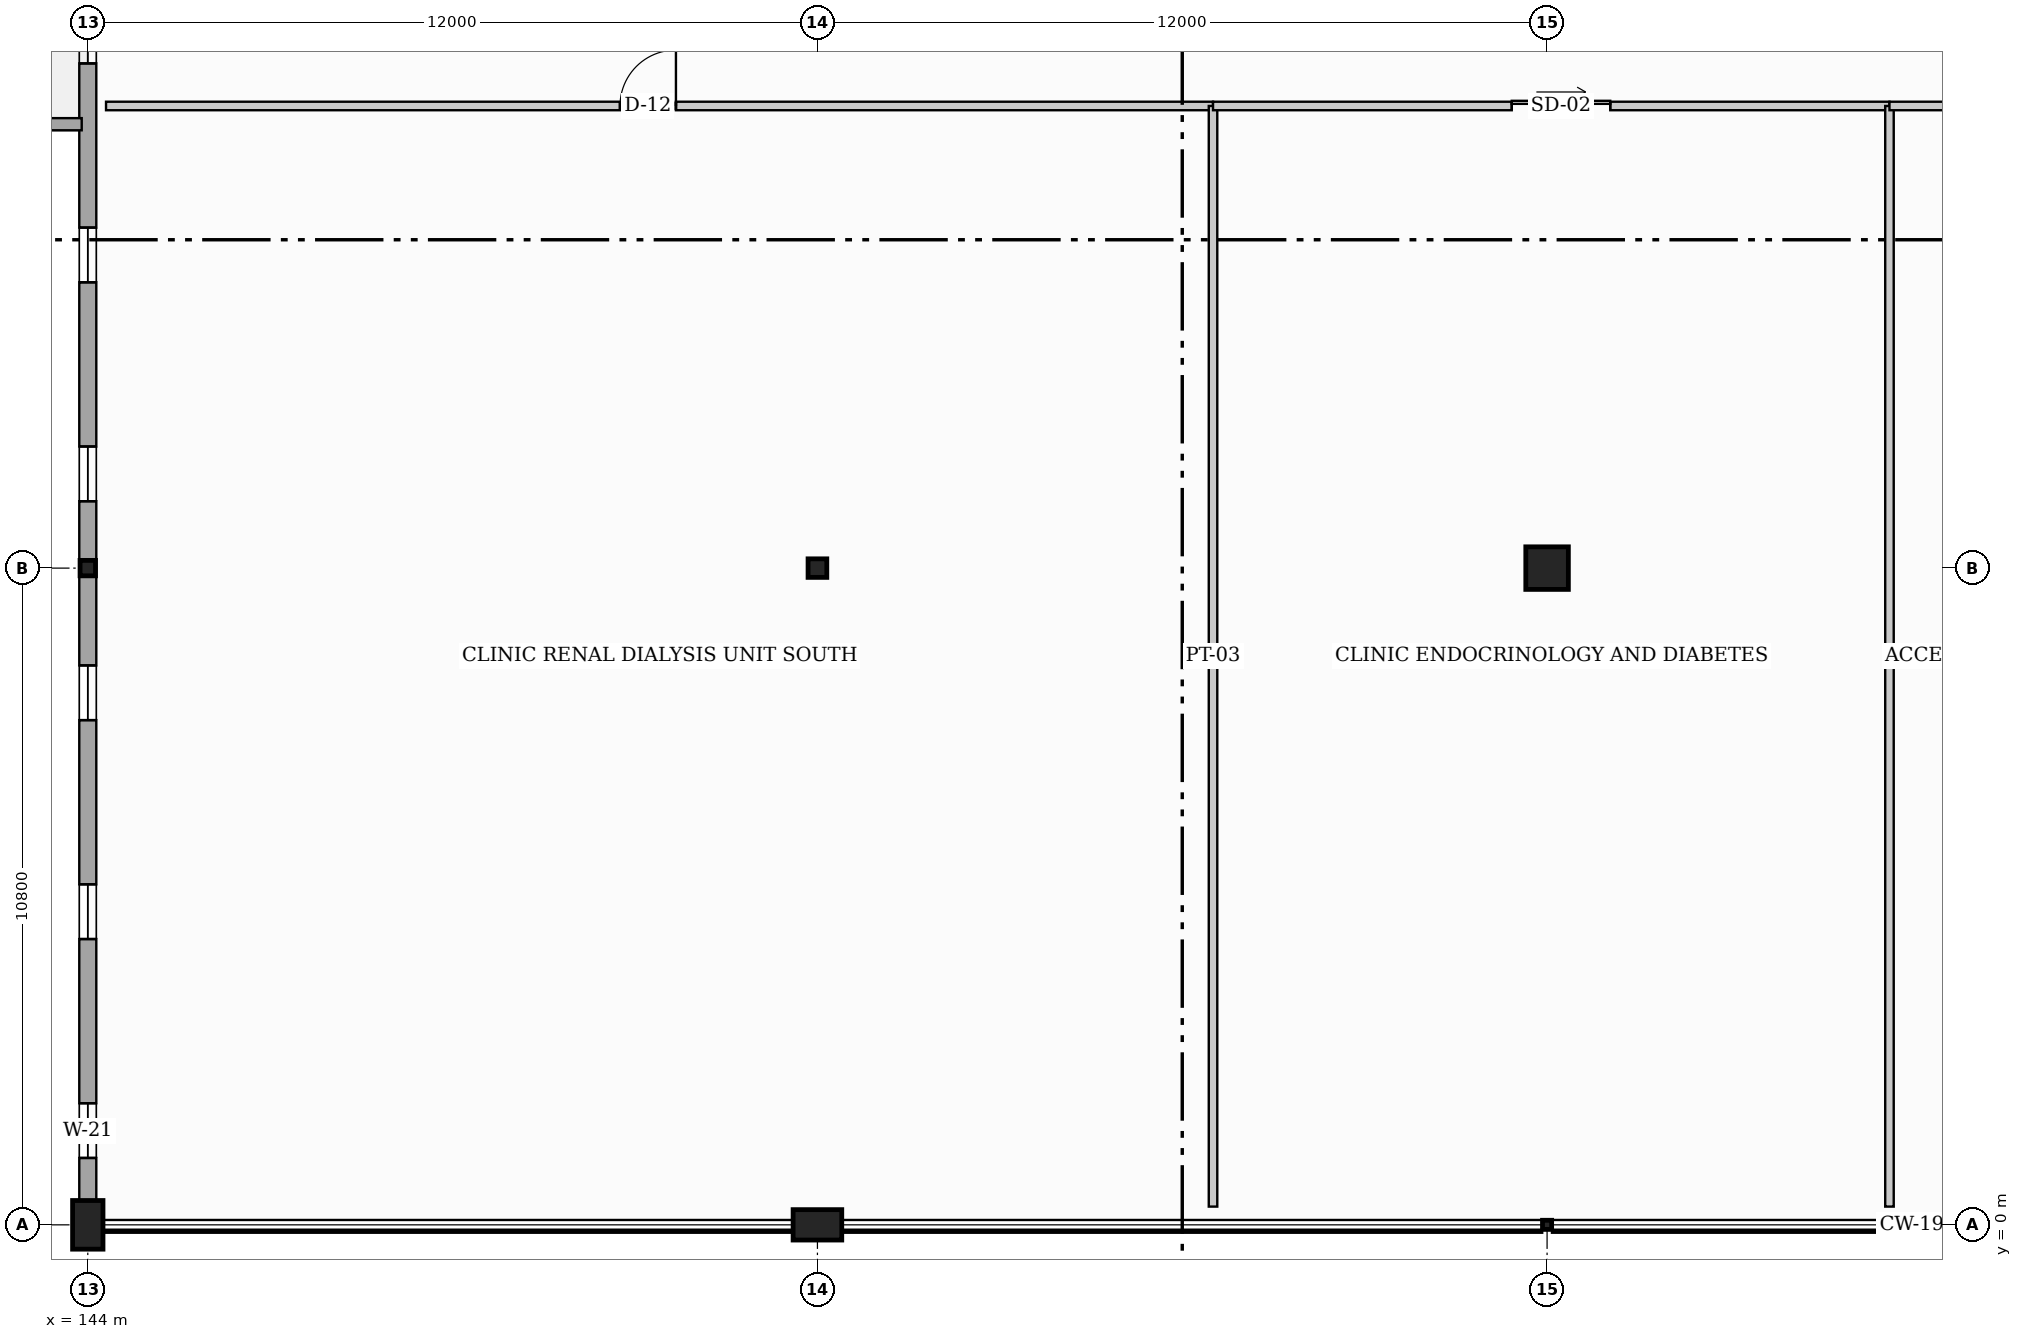
"""IFC4 building model, lengths in metres.
Left out: names, types, materials, properties, quantities, classifications, styles, units other than length and angle.
Written with IfcOpenShell. Run it as: python <this file> out.ifc"""

import sys

from ifc_helpers import new_model, si_unit, direction, frame, frame_2d, origin, origin_2d, place, context, subcontext, project, spatial, rectangle, hollow_rectangle, i_section, extrude, element, fill, save


model = new_model("IFC4")
c1 = context("Model", 3, precision=1e-05, world=origin(), true_north=direction((0.0, 1.0)))
c2 = subcontext(c1, "Body", "Model", "MODEL_VIEW")
j1 = project(units=[si_unit("LENGTHUNIT", "METRE"), si_unit("PLANEANGLEUNIT", "RADIAN")], contexts=[c1])
p1 = place(None, origin())
s1 = spatial("IfcSite", under=j1, at=p1, CompositionType="ELEMENT")
p2 = place(p1, origin())
s2 = spatial("IfcBuilding", under=s1, at=p2, CompositionType="ELEMENT")
p3 = place(p2, frame((0.0, 0.0, 14.4)))
s3 = spatial("IfcBuildingStorey", under=s2, at=p3, CompositionType="ELEMENT", Elevation=14.4)
p4 = place(p3, frame((144.0, 0.0, 0.0), z_axis=(0.0, 0.0, 1.0), x_axis=(1.0, 0.0, 0.0)))
e1 = element("IfcColumn", 1, at=p4, inside=s3, PredefinedType="PILASTER", context=c2, shape_type="SweptSolid", body=[
    extrude(rectangle(XDim=0.5, YDim=0.8, at=origin_2d()), origin(), (0.0, 0.0, 1.0), 3.9),
])
p5 = place(p3, frame((144.0, 10.8, 0.0), z_axis=(0.0, 0.0, 1.0), x_axis=(1.0, 0.0, 0.0)))
e2 = element("IfcColumn", 2, at=p5, inside=s3, PredefinedType="COLUMN", context=c2, shape_type="SweptSolid", body=[
    extrude(i_section(OverallWidth=0.254, OverallDepth=0.254, WebThickness=0.009, FlangeThickness=0.014, at=origin_2d()), origin(), (0.0, 0.0, 1.0), 3.9),
])
p6 = place(p3, frame((156.0, 0.0, 0.0), z_axis=(0.0, 0.0, 1.0), x_axis=(0.0, 1.0, 0.0)))
e3 = element("IfcColumn", 3, at=p6, inside=s3, PredefinedType="PILASTER", context=c2, shape_type="SweptSolid", body=[
    extrude(rectangle(XDim=0.5, YDim=0.8, at=origin_2d()), origin(), (0.0, 0.0, 1.0), 3.9),
])
p7 = place(p3, frame((156.0, 10.8, 0.0), z_axis=(0.0, 0.0, 1.0), x_axis=(0.0, 1.0, 0.0)))
e4 = element("IfcColumn", 4, at=p7, inside=s3, PredefinedType="COLUMN", context=c2, shape_type="SweptSolid", body=[
    extrude(i_section(OverallWidth=0.305, OverallDepth=0.308, WebThickness=0.01, FlangeThickness=0.015, at=origin_2d()), origin(), (0.0, 0.0, 1.0), 3.9),
])
p8 = place(p3, frame((168.0, 0.0, 0.0), z_axis=(0.0, 0.0, 1.0), x_axis=(1.0, 0.0, 0.0)))
e5 = element("IfcColumn", 5, at=p8, inside=s3, PredefinedType="COLUMN", context=c2, shape_type="SweptSolid", body=[
    extrude(hollow_rectangle(XDim=0.15, YDim=0.15, WallThickness=0.008, at=origin_2d()), origin(), (0.0, 0.0, 1.0), 3.9),
])
p9 = place(p3, frame((168.0, 10.8, 0.0), z_axis=(0.0, 0.0, 1.0), x_axis=(1.0, 0.0, 0.0)))
e6 = element("IfcColumn", 6, at=p9, inside=s3, PredefinedType="COLUMN", context=c2, shape_type="SweptSolid", body=[
    extrude(rectangle(XDim=0.7, YDim=0.7, at=origin_2d()), origin(), (0.0, 0.0, 1.0), 3.9),
])
p10 = place(p3, frame((144.0, 0.0, 0.0), z_axis=(0.0, 0.0, 1.0), x_axis=(0.0, 1.0, 0.0)))
e7 = element("IfcWall", 7, at=p10, inside=s3, PredefinedType="STANDARD", context=c2, shape_type="SweptSolid", body=[
    extrude(rectangle(XDim=45.6, YDim=0.28, at=frame_2d((22.8, 0.0))), origin(), (0.0, 0.0, 1.0), 2.985),
])
p11 = place(p10, frame((1.1, 0.0, 0.95)))
e8 = element("IfcOpeningElement", 8, at=p11, cuts=e7, PredefinedType="OPENING", context=c2, shape_type="SweptSolid", body=[
    extrude(rectangle(XDim=0.9, YDim=1.8, at=frame_2d((0.45, 0.9))), frame((0.0, 0.15, 0.0), z_axis=(0.0, -1.0, 0.0), x_axis=(1.0, 0.0, 0.0)), (0.0, 0.0, 1.0), 0.3),
])
p12 = place(p10, frame((4.7, 0.0, 0.95)))
e9 = element("IfcOpeningElement", 9, at=p12, cuts=e7, PredefinedType="OPENING", context=c2, shape_type="SweptSolid", body=[
    extrude(rectangle(XDim=0.9, YDim=1.8, at=frame_2d((0.45, 0.9))), frame((0.0, 0.15, 0.0), z_axis=(0.0, -1.0, 0.0), x_axis=(1.0, 0.0, 0.0)), (0.0, 0.0, 1.0), 0.3),
])
p13 = place(p10, frame((8.3, 0.0, 0.95)))
e10 = element("IfcOpeningElement", 10, at=p13, cuts=e7, PredefinedType="OPENING", context=c2, shape_type="SweptSolid", body=[
    extrude(rectangle(XDim=0.9, YDim=1.8, at=frame_2d((0.45, 0.9))), frame((0.0, 0.15, 0.0), z_axis=(0.0, -1.0, 0.0), x_axis=(1.0, 0.0, 0.0)), (0.0, 0.0, 1.0), 0.3),
])
p14 = place(p10, frame((11.9, 0.0, 0.95)))
e11 = element("IfcOpeningElement", 11, at=p14, cuts=e7, PredefinedType="OPENING", context=c2, shape_type="SweptSolid", body=[
    extrude(rectangle(XDim=0.9, YDim=1.8, at=frame_2d((0.45, 0.9))), frame((0.0, 0.15, 0.0), z_axis=(0.0, -1.0, 0.0), x_axis=(1.0, 0.0, 0.0)), (0.0, 0.0, 1.0), 0.3),
])
p15 = place(p10, frame((15.5, 0.0, 0.95)))
e12 = element("IfcOpeningElement", 12, at=p15, cuts=e7, PredefinedType="OPENING", context=c2, shape_type="SweptSolid", body=[
    extrude(rectangle(XDim=0.9, YDim=1.8, at=frame_2d((0.45, 0.9))), frame((0.0, 0.15, 0.0), z_axis=(0.0, -1.0, 0.0), x_axis=(1.0, 0.0, 0.0)), (0.0, 0.0, 1.0), 0.3),
])
p16 = place(p10, frame((19.1, 0.0, 0.95)))
e13 = element("IfcOpeningElement", 13, at=p16, cuts=e7, PredefinedType="OPENING", context=c2, shape_type="SweptSolid", body=[
    extrude(rectangle(XDim=0.9, YDim=1.8, at=frame_2d((0.45, 0.9))), frame((0.0, 0.15, 0.0), z_axis=(0.0, -1.0, 0.0), x_axis=(1.0, 0.0, 0.0)), (0.0, 0.0, 1.0), 0.3),
])
p17 = place(p10, frame((22.7, 0.0, 0.95)))
e14 = element("IfcOpeningElement", 14, at=p17, cuts=e7, PredefinedType="OPENING", context=c2, shape_type="SweptSolid", body=[
    extrude(rectangle(XDim=0.9, YDim=1.8, at=frame_2d((0.45, 0.9))), frame((0.0, 0.15, 0.0), z_axis=(0.0, -1.0, 0.0), x_axis=(1.0, 0.0, 0.0)), (0.0, 0.0, 1.0), 0.3),
])
p18 = place(p10, frame((26.3, 0.0, 0.95)))
e15 = element("IfcOpeningElement", 15, at=p18, cuts=e7, PredefinedType="OPENING", context=c2, shape_type="SweptSolid", body=[
    extrude(rectangle(XDim=0.9, YDim=1.8, at=frame_2d((0.45, 0.9))), frame((0.0, 0.15, 0.0), z_axis=(0.0, -1.0, 0.0), x_axis=(1.0, 0.0, 0.0)), (0.0, 0.0, 1.0), 0.3),
])
p19 = place(p10, frame((29.9, 0.0, 0.95)))
e16 = element("IfcOpeningElement", 16, at=p19, cuts=e7, PredefinedType="OPENING", context=c2, shape_type="SweptSolid", body=[
    extrude(rectangle(XDim=0.9, YDim=1.8, at=frame_2d((0.45, 0.9))), frame((0.0, 0.15, 0.0), z_axis=(0.0, -1.0, 0.0), x_axis=(1.0, 0.0, 0.0)), (0.0, 0.0, 1.0), 0.3),
])
p20 = place(p10, frame((37.1, 0.0, 0.95)))
e17 = element("IfcOpeningElement", 17, at=p20, cuts=e7, PredefinedType="OPENING", context=c2, shape_type="SweptSolid", body=[
    extrude(rectangle(XDim=0.9, YDim=1.8, at=frame_2d((0.45, 0.9))), frame((0.0, 0.15, 0.0), z_axis=(0.0, -1.0, 0.0), x_axis=(1.0, 0.0, 0.0)), (0.0, 0.0, 1.0), 0.3),
])
p21 = place(p10, frame((40.7, 0.0, 0.95)))
e18 = element("IfcOpeningElement", 18, at=p21, cuts=e7, PredefinedType="OPENING", context=c2, shape_type="SweptSolid", body=[
    extrude(rectangle(XDim=0.9, YDim=1.8, at=frame_2d((0.45, 0.9))), frame((0.0, 0.15, 0.0), z_axis=(0.0, -1.0, 0.0), x_axis=(1.0, 0.0, 0.0)), (0.0, 0.0, 1.0), 0.3),
])
p22 = place(p3, frame((143.9, 18.1, 0.31), z_axis=(0.0, 0.0, 1.0), x_axis=(-1.0, 0.0, 0.0)))
e19 = element("IfcWall", 19, at=p22, inside=s3, PredefinedType="PARAPET", context=c2, shape_type="SweptSolid", body=[
    extrude(rectangle(XDim=11.8, YDim=0.2, at=frame_2d((5.9, 0.0))), origin(), (0.0, 0.0, 1.0), 1.12),
])
p23 = place(p3, frame((144.3, 18.4, 0.0), z_axis=(0.0, 0.0, 1.0), x_axis=(1.0, 0.0, 0.0)))
e20 = element("IfcWall", 20, at=p23, inside=s3, PredefinedType="PARTITIONING", context=c2, shape_type="SweptSolid", body=[
    extrude(rectangle(XDim=18.206, YDim=0.14, at=frame_2d((9.103, 0.0))), origin(), (0.0, 0.0, 1.0), 3.273),
])
p24 = place(p23, frame((8.453, 0.0, 0.0)))
e21 = element("IfcOpeningElement", 21, at=p24, cuts=e20, PredefinedType="OPENING", context=c2, shape_type="SweptSolid", body=[
    extrude(rectangle(XDim=0.92, YDim=2.04, at=frame_2d((0.46, 1.02))), frame((0.0, 0.08, 0.0), z_axis=(0.0, -1.0, 0.0), x_axis=(1.0, 0.0, 0.0)), (0.0, 0.0, 1.0), 0.16),
])
p25 = place(p3, frame((162.506, 0.3, 0.0), z_axis=(0.0, 0.0, 1.0), x_axis=(0.0, 1.0, 0.0)))
e22 = element("IfcWall", 22, at=p25, inside=s3, PredefinedType="PARTITIONING", context=c2, shape_type="SweptSolid", body=[
    extrude(rectangle(XDim=18.1, YDim=0.14, at=frame_2d((9.05, 0.0))), origin(), (0.0, 0.0, 1.0), 2.985),
])
p26 = place(p3, frame((162.506, 18.4, 0.0), z_axis=(0.0, 0.0, 1.0), x_axis=(1.0, 0.0, 0.0)))
e23 = element("IfcWall", 23, at=p26, inside=s3, PredefinedType="PARTITIONING", context=c2, shape_type="SweptSolid", body=[
    extrude(rectangle(XDim=11.125, YDim=0.14, at=frame_2d((5.562, 0.0))), origin(), (0.0, 0.0, 1.0), 3.283),
])
p27 = place(p26, frame((4.913, 0.0, 0.0)))
e24 = element("IfcOpeningElement", 24, at=p27, cuts=e23, PredefinedType="OPENING", context=c2, shape_type="SweptSolid", body=[
    extrude(rectangle(XDim=1.62, YDim=2.3, at=frame_2d((0.81, 1.15))), frame((0.0, 0.08, 0.0), z_axis=(0.0, -1.0, 0.0), x_axis=(1.0, 0.0, 0.0)), (0.0, 0.0, 1.0), 0.16),
])
p28 = place(p3, frame((173.631, 0.3, 0.0), z_axis=(0.0, 0.0, 1.0), x_axis=(0.0, 1.0, 0.0)))
e25 = element("IfcWall", 25, at=p28, inside=s3, PredefinedType="PARTITIONING", context=c2, shape_type="SweptSolid", body=[
    extrude(rectangle(XDim=18.1, YDim=0.14, at=frame_2d((9.05, 0.0))), origin(), (0.0, 0.0, 1.0), 3.193),
])
p29 = place(p3, frame((173.631, 18.4, 0.0), z_axis=(0.0, 0.0, 1.0), x_axis=(1.0, 0.0, 0.0)))
e26 = element("IfcWall", 26, at=p29, inside=s3, PredefinedType="PARTITIONING", context=c2, shape_type="SweptSolid", body=[
    extrude(rectangle(XDim=6.069, YDim=0.14, at=frame_2d((3.034, 0.0))), origin(), (0.0, 0.0, 1.0), 3.352),
])
p30 = place(p29, frame((2.384, 0.0, 0.0)))
e27 = element("IfcOpeningElement", 27, at=p30, cuts=e26, PredefinedType="OPENING", context=c2, shape_type="SweptSolid", body=[
    extrude(rectangle(XDim=1.48, YDim=2.26, at=frame_2d((0.74, 1.13))), frame((0.0, 0.08, 0.0), z_axis=(0.0, -1.0, 0.0), x_axis=(1.0, 0.0, 0.0)), (0.0, 0.0, 1.0), 0.16),
])
p31 = place(p11, origin())
e28 = element("IfcWindow", 28, at=p31, inside=s3, PartitioningType="SINGLE_PANEL", PredefinedType="WINDOW", context=c2, shape_type="SweptSolid", body=[
    extrude(rectangle(XDim=0.9, YDim=1.8, at=frame_2d((0.45, 0.9))), frame((0.0, 0.03, 0.0), z_axis=(0.0, -1.0, 0.0), x_axis=(1.0, 0.0, 0.0)), (0.0, 0.0, 1.0), 0.06),
])
fill(e8, e28)
p32 = place(p12, origin())
e29 = element("IfcWindow", 29, at=p32, inside=s3, PartitioningType="SINGLE_PANEL", PredefinedType="WINDOW", context=c2, shape_type="SweptSolid", body=[
    extrude(rectangle(XDim=0.9, YDim=1.8, at=frame_2d((0.45, 0.9))), frame((0.0, 0.03, 0.0), z_axis=(0.0, -1.0, 0.0), x_axis=(1.0, 0.0, 0.0)), (0.0, 0.0, 1.0), 0.06),
])
fill(e9, e29)
p33 = place(p13, origin())
e30 = element("IfcWindow", 30, at=p33, inside=s3, PartitioningType="SINGLE_PANEL", PredefinedType="WINDOW", context=c2, shape_type="SweptSolid", body=[
    extrude(rectangle(XDim=0.9, YDim=1.8, at=frame_2d((0.45, 0.9))), frame((0.0, 0.03, 0.0), z_axis=(0.0, -1.0, 0.0), x_axis=(1.0, 0.0, 0.0)), (0.0, 0.0, 1.0), 0.06),
])
fill(e10, e30)
p34 = place(p14, origin())
e31 = element("IfcWindow", 31, at=p34, inside=s3, PartitioningType="SINGLE_PANEL", PredefinedType="WINDOW", context=c2, shape_type="SweptSolid", body=[
    extrude(rectangle(XDim=0.9, YDim=1.8, at=frame_2d((0.45, 0.9))), frame((0.0, 0.03, 0.0), z_axis=(0.0, -1.0, 0.0), x_axis=(1.0, 0.0, 0.0)), (0.0, 0.0, 1.0), 0.06),
])
fill(e11, e31)
p35 = place(p15, origin())
e32 = element("IfcWindow", 32, at=p35, inside=s3, PartitioningType="SINGLE_PANEL", PredefinedType="WINDOW", context=c2, shape_type="SweptSolid", body=[
    extrude(rectangle(XDim=0.9, YDim=1.8, at=frame_2d((0.45, 0.9))), frame((0.0, 0.03, 0.0), z_axis=(0.0, -1.0, 0.0), x_axis=(1.0, 0.0, 0.0)), (0.0, 0.0, 1.0), 0.06),
])
fill(e12, e32)
p36 = place(p16, origin())
e33 = element("IfcWindow", 33, at=p36, inside=s3, PartitioningType="SINGLE_PANEL", PredefinedType="WINDOW", context=c2, shape_type="SweptSolid", body=[
    extrude(rectangle(XDim=0.9, YDim=1.8, at=frame_2d((0.45, 0.9))), frame((0.0, 0.03, 0.0), z_axis=(0.0, -1.0, 0.0), x_axis=(1.0, 0.0, 0.0)), (0.0, 0.0, 1.0), 0.06),
])
fill(e13, e33)
p37 = place(p24, origin())
e34 = element("IfcDoor", 34, at=p37, inside=s3, OperationType="SINGLE_SWING_RIGHT", PredefinedType="DOOR", context=c2, shape_type="SweptSolid", body=[
    extrude(rectangle(XDim=0.92, YDim=2.04, at=frame_2d((0.46, 1.02))), frame((0.0, 0.025, 0.0), z_axis=(0.0, -1.0, 0.0), x_axis=(1.0, 0.0, 0.0)), (0.0, 0.0, 1.0), 0.05),
])
fill(e21, e34)
p38 = place(p27, origin())
e35 = element("IfcDoor", 35, at=p38, inside=s3, OperationType="SLIDING_TO_RIGHT", PredefinedType="DOOR", context=c2, shape_type="SweptSolid", body=[
    extrude(rectangle(XDim=1.62, YDim=2.3, at=frame_2d((0.81, 1.15))), frame((0.0, 0.025, 0.0), z_axis=(0.0, -1.0, 0.0), x_axis=(1.0, 0.0, 0.0)), (0.0, 0.0, 1.0), 0.05),
])
fill(e24, e35)
save(model, sys.argv[1])
